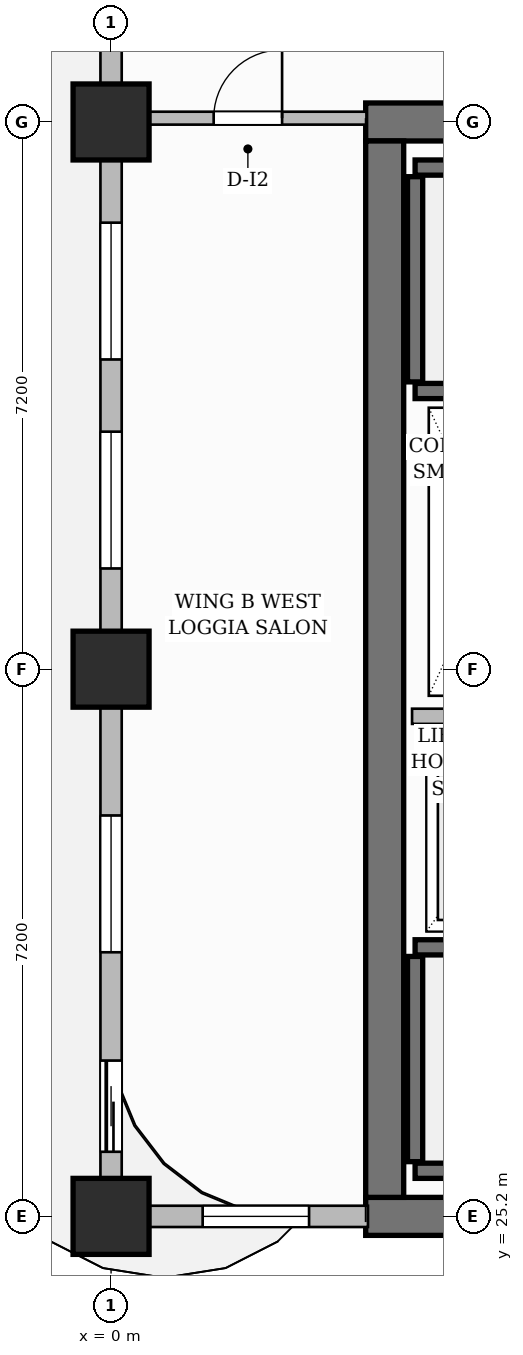
"""IFC4 building model, lengths in metres.
Left out: names, types, materials, properties, quantities, classifications, styles, units other than length and angle.
Written with IfcOpenShell. Run it as: python <this file> out.ifc"""

import sys

from ifc_helpers import new_model, si_unit, direction, frame, frame_2d, origin, origin_2d, place, context, subcontext, project, spatial, rectangle, extrude, source, transform, mapped, element, fill, save


model = new_model("IFC4")
c1 = context("Model", 3, precision=1e-05, world=origin(), true_north=direction((0.0, 1.0)))
c2 = subcontext(c1, "Body", "Model", "MODEL_VIEW")
j1 = project(units=[si_unit("LENGTHUNIT", "METRE"), si_unit("PLANEANGLEUNIT", "RADIAN")], contexts=[c1])
p1 = place(None, origin())
s1 = spatial("IfcSite", under=j1, at=p1, CompositionType="ELEMENT")
p2 = place(p1, origin())
s2 = spatial("IfcBuilding", under=s1, at=p2, CompositionType="ELEMENT")
p3 = place(p2, frame((0.0, 0.0, 181.1)))
s3 = spatial("IfcBuildingStorey", under=s2, at=p3, CompositionType="ELEMENT", Elevation=181.1)
for number, where, z_axis, x_axis in (
    (1, (3.35, 25.2, 0.0), (0.0, 0.0, 1.0), (1.0, 0.0, 0.0)),
    (2, (3.35, 39.6, 0.0), (0.0, 0.0, 1.0), (1.0, 0.0, 0.0)),
):
    element("IfcWall", number, at=place(p3, frame(where, z_axis=z_axis, x_axis=x_axis)), inside=s3, PredefinedType="SHEAR", context=c2, shape_type="SweptSolid", body=[
        extrude(rectangle(XDim=8.3, YDim=0.5, at=frame_2d((4.15, 0.0))), origin(), (0.0, 0.0, 1.0), 3.85),
    ])
p4 = place(p3, frame((3.6, 25.45, 0.0), z_axis=(0.0, 0.0, 1.0), x_axis=(0.0, 1.0, 0.0)))
e3 = element("IfcWall", 3, at=p4, inside=s3, PredefinedType="SHEAR", context=c2, shape_type="SweptSolid", body=[
    extrude(rectangle(XDim=13.9, YDim=0.5, at=frame_2d((6.95, 0.0))), origin(), (0.0, 0.0, 1.0), 3.85),
])
m1 = source(origin(), c2, "Body", "SweptSolid", [
    extrude(rectangle(XDim=1.0, YDim=1.0, at=origin_2d()), origin(), (0.0, 0.0, 1.0), 3.85),
])
for number, where, z_axis, x_axis in (
    (4, (0.0, 25.2, 0.0), (0.0, 0.0, 1.0), (1.0, 0.0, 0.0)),
    (5, (0.0, 32.4, 0.0), (0.0, 0.0, 1.0), (1.0, 0.0, 0.0)),
    (6, (0.0, 39.6, 0.0), (0.0, 0.0, 1.0), (1.0, 0.0, 0.0)),
):
    element("IfcColumn", number, at=place(p3, frame(where, z_axis=z_axis, x_axis=x_axis)), inside=s3, PredefinedType="COLUMN", context=c2, shape_type="MappedRepresentation", body=[
        mapped(m1, transform((0.0, 0.0, 0.0), scale=1.0)),
    ])
p5 = place(p3, frame((4.0, 25.8, 0.0), z_axis=(0.0, 0.0, 1.0), x_axis=(1.0, 0.0, 0.0)))
e7 = element("IfcWall", 7, at=p5, inside=s3, PredefinedType="SHEAR", context=c2, shape_type="SweptSolid", body=[
    extrude(rectangle(XDim=7.1, YDim=0.2, at=frame_2d((3.55, 0.0))), origin(), (0.0, 0.0, 1.0), 3.85),
])
p6 = place(p3, frame((4.0, 25.92, 0.0), z_axis=(0.0, 0.0, 1.0), x_axis=(0.0, 1.0, 0.0)))
e8 = element("IfcWall", 8, at=p6, inside=s3, PredefinedType="SHEAR", context=c2, shape_type="SweptSolid", body=[
    extrude(rectangle(XDim=2.7, YDim=0.2, at=frame_2d((1.35, 0.0))), origin(), (0.0, 0.0, 1.0), 3.85),
])
p7 = place(p3, frame((4.0, 28.74, 0.0), z_axis=(0.0, 0.0, 1.0), x_axis=(1.0, 0.0, 0.0)))
e9 = element("IfcWall", 9, at=p7, inside=s3, PredefinedType="SHEAR", context=c2, shape_type="SweptSolid", body=[
    extrude(rectangle(XDim=7.1, YDim=0.2, at=frame_2d((3.55, 0.0))), origin(), (0.0, 0.0, 1.0), 3.85),
])
p8 = place(p7, frame((5.815, 0.0, 0.0)))
e10 = element("IfcOpeningElement", 10, at=p8, cuts=e9, PredefinedType="OPENING", context=c2, shape_type="SweptSolid", body=[
    extrude(rectangle(XDim=1.05, YDim=2.2, at=frame_2d((0.525, 1.1))), frame((0.0, 0.11, 0.0), z_axis=(0.0, -1.0, 0.0), x_axis=(1.0, 0.0, 0.0)), (0.0, 0.0, 1.0), 0.22),
])
p9 = place(p3, frame((4.0, 39.0, 0.0), z_axis=(0.0, 0.0, 1.0), x_axis=(1.0, 0.0, 0.0)))
e11 = element("IfcWall", 11, at=p9, inside=s3, PredefinedType="SHEAR", context=c2, shape_type="SweptSolid", body=[
    extrude(rectangle(XDim=7.1, YDim=0.2, at=frame_2d((3.55, 0.0))), origin(), (0.0, 0.0, 1.0), 3.85),
])
p10 = place(p3, frame((4.0, 36.18, 0.0), z_axis=(0.0, 0.0, 1.0), x_axis=(0.0, 1.0, 0.0)))
e12 = element("IfcWall", 12, at=p10, inside=s3, PredefinedType="SHEAR", context=c2, shape_type="SweptSolid", body=[
    extrude(rectangle(XDim=2.7, YDim=0.2, at=frame_2d((1.35, 0.0))), origin(), (0.0, 0.0, 1.0), 3.85),
])
p11 = place(p3, frame((4.0, 36.06, 0.0), z_axis=(0.0, 0.0, 1.0), x_axis=(1.0, 0.0, 0.0)))
e13 = element("IfcWall", 13, at=p11, inside=s3, PredefinedType="SHEAR", context=c2, shape_type="SweptSolid", body=[
    extrude(rectangle(XDim=7.1, YDim=0.2, at=frame_2d((3.55, 0.0))), origin(), (0.0, 0.0, 1.0), 3.85),
])
p12 = place(p11, frame((5.815, 0.0, 0.0)))
e14 = element("IfcOpeningElement", 14, at=p12, cuts=e13, PredefinedType="OPENING", context=c2, shape_type="SweptSolid", body=[
    extrude(rectangle(XDim=1.05, YDim=2.2, at=frame_2d((0.525, 1.1))), frame((0.0, 0.11, 0.0), z_axis=(0.0, -1.0, 0.0), x_axis=(1.0, 0.0, 0.0)), (0.0, 0.0, 1.0), 0.22),
])
p13 = place(p3, frame((3.96, 31.78, 0.0), z_axis=(0.0, 0.0, 1.0), x_axis=(1.0, 0.0, 0.0)))
e15 = element("IfcWall", 15, at=p13, inside=s3, PredefinedType="PARTITIONING", context=c2, shape_type="SweptSolid", body=[
    extrude(rectangle(XDim=2.13, YDim=0.2, at=frame_2d((1.065, 0.0))), origin(), (0.0, 0.0, 1.0), 3.6),
])
p14 = place(p3, frame((0.24, 39.65, 0.0), z_axis=(0.0, 0.0, 1.0), x_axis=(1.0, 0.0, 0.0)))
e16 = element("IfcWall", 16, at=p14, inside=s3, PredefinedType="PARTITIONING", context=c2, shape_type="SweptSolid", body=[
    extrude(rectangle(XDim=3.12, YDim=0.17, at=frame_2d((1.56, 0.0))), origin(), (0.0, 0.0, 1.0), 3.6),
])
p15 = place(p14, frame((1.11, 0.0, 0.0)))
e17 = element("IfcOpeningElement", 17, at=p15, cuts=e16, PredefinedType="OPENING", context=c2, shape_type="SweptSolid", body=[
    extrude(rectangle(XDim=0.9, YDim=2.15, at=frame_2d((0.45, 1.075))), frame((0.0, 0.095, 0.0), z_axis=(0.0, -1.0, 0.0), x_axis=(1.0, 0.0, 0.0)), (0.0, 0.0, 1.0), 0.19),
])
p16 = place(p3, frame((0.0, 25.2, 0.0), z_axis=(0.0, 0.0, 1.0), x_axis=(1.0, 0.0, 0.0)))
e18 = element("IfcWall", 18, at=p16, inside=s3, PredefinedType="SOLIDWALL", context=c2, shape_type="SweptSolid", body=[
    extrude(rectangle(XDim=3.38, YDim=0.28, at=frame_2d((1.69, 0.0))), origin(), (0.0, 0.0, 1.0), 3.6),
])
p17 = place(p16, frame((1.205, 0.0, 0.8)))
e19 = element("IfcOpeningElement", 19, at=p17, cuts=e18, PredefinedType="OPENING", context=c2, shape_type="SweptSolid", body=[
    extrude(rectangle(XDim=1.4, YDim=1.85, at=frame_2d((0.7, 0.925))), frame((0.0, 0.15, 0.0), z_axis=(0.0, -1.0, 0.0), x_axis=(1.0, 0.0, 0.0)), (0.0, 0.0, 1.0), 0.3),
])
p18 = place(p3, frame((0.0, 25.25, 0.0), z_axis=(0.0, 0.0, 1.0), x_axis=(0.0, 1.0, 0.0)))
e20 = element("IfcWall", 20, at=p18, inside=s3, PredefinedType="SOLIDWALL", context=c2, shape_type="SweptSolid", body=[
    extrude(rectangle(XDim=21.5, YDim=0.28, at=frame_2d((10.75, 0.0))), origin(), (0.0, 0.0, 1.0), 3.085),
])
p19 = place(p18, frame((18.45, 0.0, 0.0)))
e21 = element("IfcOpeningElement", 21, at=p19, cuts=e20, PredefinedType="OPENING", context=c2, shape_type="SweptSolid", body=[
    extrude(rectangle(XDim=1.2, YDim=2.2, at=frame_2d((0.6, 1.1))), frame((0.0, 0.15, 0.0), z_axis=(0.0, -1.0, 0.0), x_axis=(1.0, 0.0, 0.0)), (0.0, 0.0, 1.0), 0.3),
])
p20 = place(p18, frame((0.8, 0.0, 0.0)))
e22 = element("IfcOpeningElement", 22, at=p20, cuts=e20, PredefinedType="OPENING", context=c2, shape_type="SweptSolid", body=[
    extrude(rectangle(XDim=1.2, YDim=2.2, at=frame_2d((0.6, 1.1))), frame((0.0, 0.15, 0.0), z_axis=(0.0, -1.0, 0.0), x_axis=(1.0, 0.0, 0.0)), (0.0, 0.0, 1.0), 0.3),
])
p21 = place(p18, frame((3.425, 0.0, 0.8)))
e23 = element("IfcOpeningElement", 23, at=p21, cuts=e20, PredefinedType="OPENING", context=c2, shape_type="SweptSolid", body=[
    extrude(rectangle(XDim=1.8, YDim=1.85, at=frame_2d((0.9, 0.925))), frame((0.0, 0.15, 0.0), z_axis=(0.0, -1.0, 0.0), x_axis=(1.0, 0.0, 0.0)), (0.0, 0.0, 1.0), 0.3),
])
p22 = place(p18, frame((8.475, 0.0, 0.8)))
e24 = element("IfcOpeningElement", 24, at=p22, cuts=e20, PredefinedType="OPENING", context=c2, shape_type="SweptSolid", body=[
    extrude(rectangle(XDim=1.8, YDim=1.85, at=frame_2d((0.9, 0.925))), frame((0.0, 0.15, 0.0), z_axis=(0.0, -1.0, 0.0), x_axis=(1.0, 0.0, 0.0)), (0.0, 0.0, 1.0), 0.3),
])
p23 = place(p18, frame((11.225, 0.0, 0.8)))
e25 = element("IfcOpeningElement", 25, at=p23, cuts=e20, PredefinedType="OPENING", context=c2, shape_type="SweptSolid", body=[
    extrude(rectangle(XDim=1.8, YDim=1.85, at=frame_2d((0.9, 0.925))), frame((0.0, 0.15, 0.0), z_axis=(0.0, -1.0, 0.0), x_axis=(1.0, 0.0, 0.0)), (0.0, 0.0, 1.0), 0.3),
])
p24 = place(p18, frame((15.75, 0.0, 0.8)))
e26 = element("IfcOpeningElement", 26, at=p24, cuts=e20, PredefinedType="OPENING", context=c2, shape_type="SweptSolid", body=[
    extrude(rectangle(XDim=1.8, YDim=1.85, at=frame_2d((0.9, 0.925))), frame((0.0, 0.15, 0.0), z_axis=(0.0, -1.0, 0.0), x_axis=(1.0, 0.0, 0.0)), (0.0, 0.0, 1.0), 0.3),
])
m2 = source(origin(), c2, "Body", "SweptSolid", [
    extrude(rectangle(XDim=0.9, YDim=2.15, at=frame_2d((0.45, 1.075))), frame((0.0, 0.025, 0.0), z_axis=(0.0, -1.0, 0.0), x_axis=(1.0, 0.0, 0.0)), (0.0, 0.0, 1.0), 0.05),
])
p25 = place(p15, origin())
e27 = element("IfcDoor", 27, at=p25, inside=s3, OperationType="SINGLE_SWING_RIGHT", PredefinedType="DOOR", context=c2, shape_type="MappedRepresentation", body=[
    mapped(m2, transform((0.0, 0.0, 0.0), scale=1.0)),
])
fill(e17, e27)
m3 = source(origin(), c2, "Body", "SweptSolid", [
    extrude(rectangle(XDim=1.2, YDim=2.2, at=frame_2d((0.6, 1.1))), frame((0.0, 0.025, 0.0), z_axis=(0.0, -1.0, 0.0), x_axis=(1.0, 0.0, 0.0)), (0.0, 0.0, 1.0), 0.05),
])
p26 = place(p20, origin())
e28 = element("IfcDoor", 28, at=p26, inside=s3, OperationType="SLIDING_TO_LEFT", PredefinedType="DOOR", context=c2, shape_type="MappedRepresentation", body=[
    mapped(m3, transform((0.0, 0.0, 0.0), scale=1.0)),
])
fill(e22, e28)
m4 = source(origin(), c2, "Body", "SweptSolid", [
    extrude(rectangle(XDim=1.4, YDim=1.85, at=frame_2d((0.7, 0.925))), frame((0.0, 0.03, 0.0), z_axis=(0.0, -1.0, 0.0), x_axis=(1.0, 0.0, 0.0)), (0.0, 0.0, 1.0), 0.06),
])
p27 = place(p17, origin())
e29 = element("IfcWindow", 29, at=p27, inside=s3, PartitioningType="SINGLE_PANEL", PredefinedType="WINDOW", context=c2, shape_type="MappedRepresentation", body=[
    mapped(m4, transform((0.0, 0.0, 0.0), scale=1.0)),
])
fill(e19, e29)
m5 = source(origin(), c2, "Body", "SweptSolid", [
    extrude(rectangle(XDim=1.8, YDim=1.85, at=frame_2d((0.9, 0.925))), frame((0.0, 0.03, 0.0), z_axis=(0.0, -1.0, 0.0), x_axis=(1.0, 0.0, 0.0)), (0.0, 0.0, 1.0), 0.06),
])
p28 = place(p21, origin())
e30 = element("IfcWindow", 30, at=p28, inside=s3, PartitioningType="DOUBLE_PANEL_VERTICAL", PredefinedType="WINDOW", context=c2, shape_type="MappedRepresentation", body=[
    mapped(m5, transform((0.0, 0.0, 0.0), scale=1.0)),
])
fill(e23, e30)
p29 = place(p22, origin())
e31 = element("IfcWindow", 31, at=p29, inside=s3, PartitioningType="DOUBLE_PANEL_VERTICAL", PredefinedType="WINDOW", context=c2, shape_type="MappedRepresentation", body=[
    mapped(m5, transform((0.0, 0.0, 0.0), scale=1.0)),
])
fill(e24, e31)
p30 = place(p23, origin())
e32 = element("IfcWindow", 32, at=p30, inside=s3, PartitioningType="DOUBLE_PANEL_VERTICAL", PredefinedType="WINDOW", context=c2, shape_type="MappedRepresentation", body=[
    mapped(m5, transform((0.0, 0.0, 0.0), scale=1.0)),
])
fill(e25, e32)
save(model, sys.argv[1])
